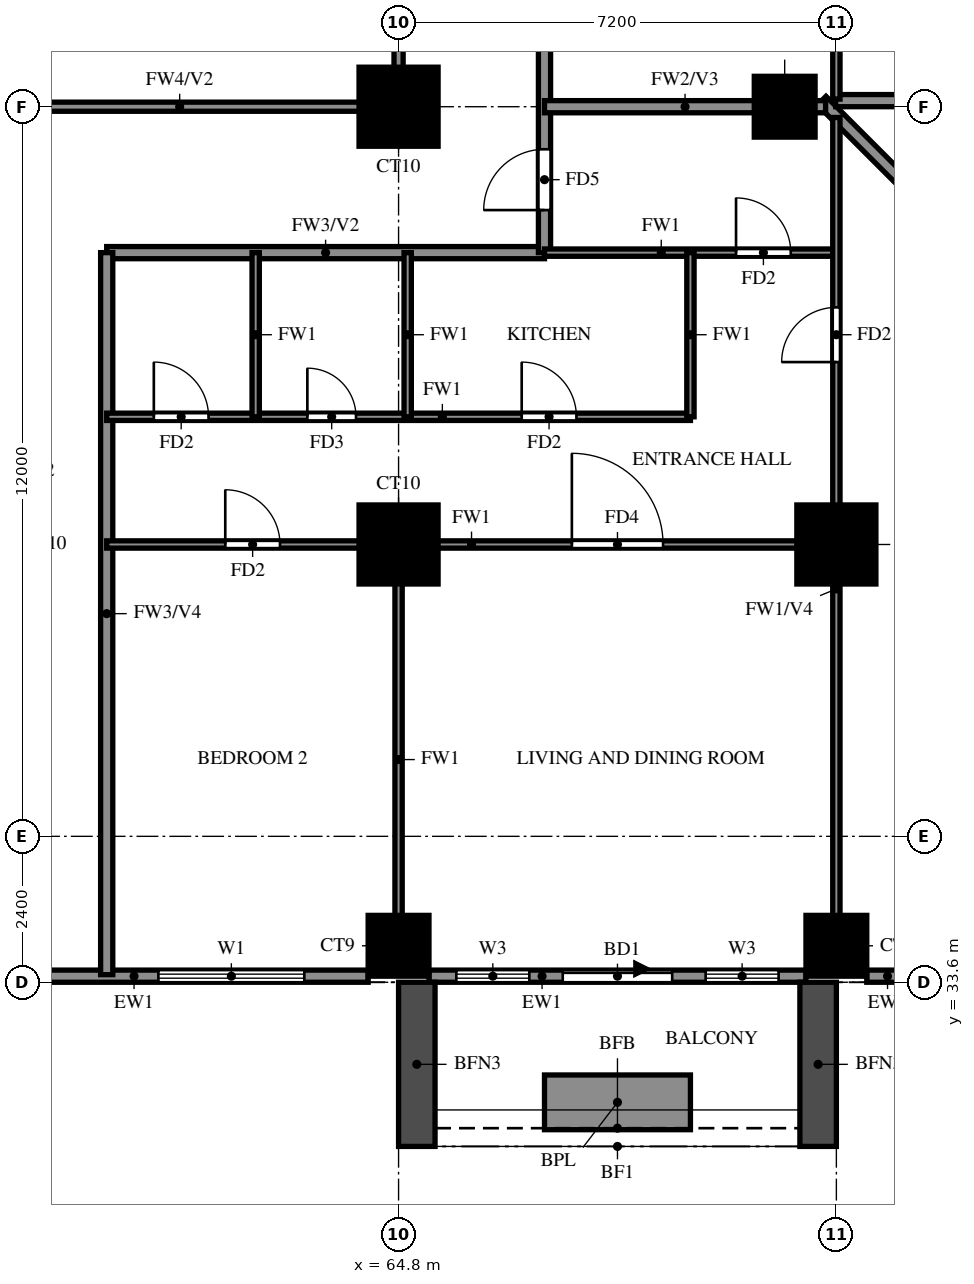
"""IFC4 building model, lengths in metres.
Left out: names, types, materials, properties, quantities, classifications, styles, units other than length and angle.
Written with IfcOpenShell. Run it as: python <this file> out.ifc"""

import sys

from ifc_helpers import new_model, si_unit, direction, frame, frame_2d, origin, origin_2d, place, context, subcontext, project, spatial, rectangle, extrude, source, transform, mapped, element, fill, save


model = new_model("IFC4")
c1 = context("Model", 3, precision=1e-05, world=origin(), true_north=direction((0.0, 1.0)))
c2 = subcontext(c1, "Body", "Model", "MODEL_VIEW")
j1 = project(units=[si_unit("LENGTHUNIT", "METRE"), si_unit("PLANEANGLEUNIT", "RADIAN")], contexts=[c1])
p1 = place(None, origin())
s1 = spatial("IfcSite", under=j1, at=p1, CompositionType="ELEMENT")
p2 = place(p1, origin())
s2 = spatial("IfcBuilding", under=s1, at=p2, CompositionType="ELEMENT")
p3 = place(p2, frame((0.0, 0.0, 65.5)))
s3 = spatial("IfcBuildingStorey", under=s2, at=p3, CompositionType="ELEMENT", Elevation=65.5)
m1 = source(origin(), c2, "Body", "SweptSolid", [
    extrude(rectangle(XDim=1.0, YDim=1.0, at=origin_2d()), origin(), (0.0, 0.0, 1.0), 3.18),
])
for number, where, z_axis, x_axis in (
    (1, (64.8, 34.2, 0.0), (0.0, 0.0, 1.0), (1.0, 0.0, 0.0)),
    (2, (72.0, 34.2, 0.0), (0.0, 0.0, 1.0), (1.0, 0.0, 0.0)),
):
    element("IfcColumn", number, at=place(p3, frame(where, z_axis=z_axis, x_axis=x_axis)), inside=s3, PredefinedType="COLUMN", context=c2, shape_type="MappedRepresentation", body=[
        mapped(m1, transform((0.0, 0.0, 0.0))),
    ])
m2 = source(origin(), c2, "Body", "SweptSolid", [
    extrude(rectangle(XDim=1.3, YDim=1.3, at=origin_2d()), origin(), (0.0, 0.0, 1.0), 3.18),
])
for number, where, z_axis, x_axis in (
    (3, (64.8, 40.8, 0.0), (0.0, 0.0, 1.0), (1.0, 0.0, 0.0)),
    (4, (72.0, 40.8, 0.0), (0.0, 0.0, 1.0), (1.0, 0.0, 0.0)),
    (5, (64.8, 48.0, 0.0), (0.0, 0.0, 1.0), (1.0, 0.0, 0.0)),
):
    element("IfcColumn", number, at=place(p3, frame(where, z_axis=z_axis, x_axis=x_axis)), inside=s3, PredefinedType="COLUMN", context=c2, shape_type="MappedRepresentation", body=[
        mapped(m2, transform((0.0, 0.0, 0.0))),
    ])
p4 = place(p3, frame((71.15, 48.0, 0.0), z_axis=(0.0, 0.0, 1.0), x_axis=(1.0, 0.0, 0.0)))
e6 = element("IfcColumn", 6, at=p4, inside=s3, PredefinedType="COLUMN", context=c2, shape_type="MappedRepresentation", body=[
    mapped(m1, transform((0.0, 0.0, 0.0))),
])
p5 = place(p3, frame((85.996, 33.863, 0.0), z_axis=(0.0, 0.0, 1.0), x_axis=(-0.707100718496, 0.707112843825, 0.0)))
e7 = element("IfcWall", 7, at=p5, inside=s3, PredefinedType="SOLIDWALL", context=c2, shape_type="SweptSolid", body=[
    extrude(rectangle(XDim=20.135, YDim=0.2, at=frame_2d((10.067, 0.0))), origin(), (0.0, 0.0, 1.0), 3.18),
])
p6 = place(p3, frame((71.989, 48.1, 0.0), z_axis=(0.0, 0.0, 1.0), x_axis=(1.0, 0.0, 0.0)))
e8 = element("IfcWall", 8, at=p6, inside=s3, PredefinedType="SOLIDWALL", context=c2, shape_type="SweptSolid", body=[
    extrude(rectangle(XDim=6.562, YDim=0.2, at=frame_2d((3.281, 0.0))), origin(), (0.0, 0.0, 1.0), 3.18),
])
p7 = place(p3, frame((58.8, 33.7, 0.0), z_axis=(0.0, 0.0, 1.0), x_axis=(1.0, 0.0, 0.0)))
e9 = element("IfcWall", 9, at=p7, inside=s3, PredefinedType="SOLIDWALL", context=c2, shape_type="SweptSolid", body=[
    extrude(rectangle(XDim=5.5, YDim=0.2, at=frame_2d((2.75, 0.0))), origin(), (0.0, 0.0, 1.0), 3.18),
])
p8 = place(p7, frame((2.05, 0.0, 0.6)))
e10 = element("IfcOpeningElement", 10, at=p8, cuts=e9, PredefinedType="OPENING", context=c2, shape_type="SweptSolid", body=[
    extrude(rectangle(XDim=2.4, YDim=2.4, at=frame_2d((1.2, 1.2))), frame((0.0, 0.11, 0.0), z_axis=(0.0, -1.0, 0.0), x_axis=(1.0, 0.0, 0.0)), (0.0, 0.0, 1.0), 0.22),
])
p9 = place(p3, frame((65.3, 33.7, 0.0), z_axis=(0.0, 0.0, 1.0), x_axis=(1.0, 0.0, 0.0)))
e11 = element("IfcWall", 11, at=p9, inside=s3, PredefinedType="SOLIDWALL", context=c2, shape_type="SweptSolid", body=[
    extrude(rectangle(XDim=6.2, YDim=0.2, at=frame_2d((3.1, 0.0))), origin(), (0.0, 0.0, 1.0), 3.18),
])
p10 = place(p9, frame((2.2, 0.0, 0.0)))
e12 = element("IfcOpeningElement", 12, at=p10, cuts=e11, PredefinedType="OPENING", context=c2, shape_type="SweptSolid", body=[
    extrude(rectangle(XDim=1.8, YDim=2.4, at=frame_2d((0.9, 1.2))), frame((0.0, 0.11, 0.0), z_axis=(0.0, -1.0, 0.0), x_axis=(1.0, 0.0, 0.0)), (0.0, 0.0, 1.0), 0.22),
])
p11 = place(p9, frame((0.45, 0.0, 0.6)))
e13 = element("IfcOpeningElement", 13, at=p11, cuts=e11, PredefinedType="OPENING", context=c2, shape_type="SweptSolid", body=[
    extrude(rectangle(XDim=1.2, YDim=2.4, at=frame_2d((0.6, 1.2))), frame((0.0, 0.11, 0.0), z_axis=(0.0, -1.0, 0.0), x_axis=(1.0, 0.0, 0.0)), (0.0, 0.0, 1.0), 0.22),
])
p12 = place(p9, frame((4.55, 0.0, 0.6)))
e14 = element("IfcOpeningElement", 14, at=p12, cuts=e11, PredefinedType="OPENING", context=c2, shape_type="SweptSolid", body=[
    extrude(rectangle(XDim=1.2, YDim=2.4, at=frame_2d((0.6, 1.2))), frame((0.0, 0.11, 0.0), z_axis=(0.0, -1.0, 0.0), x_axis=(1.0, 0.0, 0.0)), (0.0, 0.0, 1.0), 0.22),
])
p13 = place(p3, frame((72.5, 33.7, 0.0), z_axis=(0.0, 0.0, 1.0), x_axis=(1.0, 0.0, 0.0)))
e15 = element("IfcWall", 15, at=p13, inside=s3, PredefinedType="SOLIDWALL", context=c2, shape_type="SweptSolid", body=[
    extrude(rectangle(XDim=13.659, YDim=0.2, at=frame_2d((6.829, 0.0))), origin(), (0.0, 0.0, 1.0), 3.18),
])
p14 = place(p13, frame((0.8, 0.0, 0.6)))
e16 = element("IfcOpeningElement", 16, at=p14, cuts=e15, PredefinedType="OPENING", context=c2, shape_type="SweptSolid", body=[
    extrude(rectangle(XDim=2.4, YDim=2.4, at=frame_2d((1.2, 1.2))), frame((0.0, 0.11, 0.0), z_axis=(0.0, -1.0, 0.0), x_axis=(1.0, 0.0, 0.0)), (0.0, 0.0, 1.0), 0.22),
])
p15 = place(p13, frame((3.7, 0.0, 0.6)))
e17 = element("IfcOpeningElement", 17, at=p15, cuts=e15, PredefinedType="OPENING", context=c2, shape_type="SweptSolid", body=[
    extrude(rectangle(XDim=2.4, YDim=2.4, at=frame_2d((1.2, 1.2))), frame((0.0, 0.11, 0.0), z_axis=(0.0, -1.0, 0.0), x_axis=(1.0, 0.0, 0.0)), (0.0, 0.0, 1.0), 0.22),
])
p16 = place(p13, frame((7.386, 0.0, 0.6)))
e18 = element("IfcOpeningElement", 18, at=p16, cuts=e15, PredefinedType="OPENING", context=c2, shape_type="SweptSolid", body=[
    extrude(rectangle(XDim=2.4, YDim=2.4, at=frame_2d((1.2, 1.2))), frame((0.0, 0.11, 0.0), z_axis=(0.0, -1.0, 0.0), x_axis=(1.0, 0.0, 0.0)), (0.0, 0.0, 1.0), 0.22),
])
p17 = place(p13, frame((10.372, 0.0, 0.6)))
e19 = element("IfcOpeningElement", 19, at=p17, cuts=e15, PredefinedType="OPENING", context=c2, shape_type="SweptSolid", body=[
    extrude(rectangle(XDim=2.4, YDim=2.4, at=frame_2d((1.2, 1.2))), frame((0.0, 0.11, 0.0), z_axis=(0.0, -1.0, 0.0), x_axis=(1.0, 0.0, 0.0)), (0.0, 0.0, 1.0), 0.22),
])
for number, where, z_axis, x_axis in (
    (20, (65.1, 33.6, 0.0), (0.0, 0.0, 1.0), (0.0, -1.0, 0.0)),
    (21, (71.7, 33.6, 0.0), (0.0, 0.0, 1.0), (0.0, -1.0, 0.0)),
):
    element("IfcWall", number, at=place(p3, frame(where, z_axis=z_axis, x_axis=x_axis)), inside=s3, PredefinedType="SOLIDWALL", context=c2, shape_type="SweptSolid", body=[
        extrude(rectangle(XDim=2.7, YDim=0.6, at=frame_2d((1.35, 0.0))), origin(), (0.0, 0.0, 1.0), 2.85),
    ])
p18 = place(p3, frame((67.2, 31.625, 0.0), z_axis=(0.0, 0.0, 1.0), x_axis=(1.0, 0.0, 0.0)))
e22 = element("IfcWall", 22, at=p18, inside=s3, PredefinedType="SOLIDWALL", context=c2, shape_type="SweptSolid", body=[
    extrude(rectangle(XDim=2.4, YDim=0.9, at=frame_2d((1.2, 0.0))), origin(), (0.0, 0.0, 1.0), 0.9),
])
p19 = place(p3, frame((60.0, 45.6, 0.0), z_axis=(0.0, 0.0, 1.0), x_axis=(1.0, 0.0, 0.0)))
e23 = element("IfcWall", 23, at=p19, inside=s3, PredefinedType="SOLIDWALL", context=c2, shape_type="SweptSolid", body=[
    extrude(rectangle(XDim=7.2, YDim=0.2, at=frame_2d((3.6, 0.0))), origin(), (0.0, 0.0, 1.0), 3.18),
])
p20 = place(p3, frame((60.0, 33.725, 0.0), z_axis=(0.0, 0.0, 1.0), x_axis=(0.0, 1.0, 0.0)))
e24 = element("IfcWall", 24, at=p20, inside=s3, PredefinedType="SOLIDWALL", context=c2, shape_type="SweptSolid", body=[
    extrude(rectangle(XDim=11.875, YDim=0.2, at=frame_2d((5.938, 0.0))), origin(), (0.0, 0.0, 1.0), 2.28),
])
p21 = place(p3, frame((67.2, 45.6, 0.0), z_axis=(0.0, 0.0, 1.0), x_axis=(0.0, 1.0, 0.0)))
e25 = element("IfcWall", 25, at=p21, inside=s3, PredefinedType="SOLIDWALL", context=c2, shape_type="SweptSolid", body=[
    extrude(rectangle(XDim=12.0, YDim=0.2, at=frame_2d((6.0, 0.0))), origin(), (0.0, 0.0, 1.0), 3.18),
])
p22 = place(p21, frame((10.3, 0.0, 0.0)))
e26 = element("IfcOpeningElement", 26, at=p22, cuts=e25, PredefinedType="OPENING", context=c2, shape_type="SweptSolid", body=[
    extrude(rectangle(XDim=1.0, YDim=2.1, at=frame_2d((0.5, 1.05))), frame((0.0, 0.11, 0.0), z_axis=(0.0, -1.0, 0.0), x_axis=(1.0, 0.0, 0.0)), (0.0, 0.0, 1.0), 0.22),
])
p23 = place(p21, frame((0.7, 0.0, 0.0)))
e27 = element("IfcOpeningElement", 27, at=p23, cuts=e25, PredefinedType="OPENING", context=c2, shape_type="SweptSolid", body=[
    extrude(rectangle(XDim=1.0, YDim=2.1, at=frame_2d((0.5, 1.05))), frame((0.0, 0.11, 0.0), z_axis=(0.0, -1.0, 0.0), x_axis=(1.0, 0.0, 0.0)), (0.0, 0.0, 1.0), 0.22),
])
p24 = place(p3, frame((67.2, 48.0, 0.0), z_axis=(0.0, 0.0, 1.0), x_axis=(1.0, 0.0, 0.0)))
e28 = element("IfcWall", 28, at=p24, inside=s3, PredefinedType="SOLIDWALL", context=c2, shape_type="SweptSolid", body=[
    extrude(rectangle(XDim=4.623, YDim=0.2, at=frame_2d((2.312, 0.0))), origin(), (0.0, 0.0, 1.0), 3.18),
])
p25 = place(p3, frame((60.0, 40.8, 0.0), z_axis=(0.0, 0.0, 1.0), x_axis=(1.0, 0.0, 0.0)))
e29 = element("IfcWall", 29, at=p25, inside=s3, PredefinedType="PARTITIONING", context=c2, shape_type="SweptSolid", body=[
    extrude(rectangle(XDim=12.0, YDim=0.12, at=frame_2d((6.0, 0.0))), origin(), (0.0, 0.0, 1.0), 3.18),
])
p26 = place(p25, frame((7.65, 0.0, 0.0)))
e30 = element("IfcOpeningElement", 30, at=p26, cuts=e29, PredefinedType="OPENING", context=c2, shape_type="SweptSolid", body=[
    extrude(rectangle(XDim=1.5, YDim=2.1, at=frame_2d((0.75, 1.05))), frame((0.0, 0.07, 0.0), z_axis=(0.0, -1.0, 0.0), x_axis=(1.0, 0.0, 0.0)), (0.0, 0.0, 1.0), 0.14),
])
p27 = place(p25, frame((1.95, 0.0, 0.0)))
e31 = element("IfcOpeningElement", 31, at=p27, cuts=e29, PredefinedType="OPENING", context=c2, shape_type="SweptSolid", body=[
    extrude(rectangle(XDim=0.9, YDim=2.1, at=frame_2d((0.45, 1.05))), frame((0.0, 0.07, 0.0), z_axis=(0.0, -1.0, 0.0), x_axis=(1.0, 0.0, 0.0)), (0.0, 0.0, 1.0), 0.14),
])
p28 = place(p3, frame((60.0, 42.9, 0.0), z_axis=(0.0, 0.0, 1.0), x_axis=(1.0, 0.0, 0.0)))
e32 = element("IfcWall", 32, at=p28, inside=s3, PredefinedType="PARTITIONING", context=c2, shape_type="SweptSolid", body=[
    extrude(rectangle(XDim=9.6, YDim=0.12, at=frame_2d((4.8, 0.0))), origin(), (0.0, 0.0, 1.0), 3.18),
])
p29 = place(p28, frame((6.825, 0.0, 0.0)))
e33 = element("IfcOpeningElement", 33, at=p29, cuts=e32, PredefinedType="OPENING", context=c2, shape_type="SweptSolid", body=[
    extrude(rectangle(XDim=0.9, YDim=2.1, at=frame_2d((0.45, 1.05))), frame((0.0, 0.07, 0.0), z_axis=(0.0, -1.0, 0.0), x_axis=(1.0, 0.0, 0.0)), (0.0, 0.0, 1.0), 0.14),
])
p30 = place(p28, frame((3.3, 0.0, 0.0)))
e34 = element("IfcOpeningElement", 34, at=p30, cuts=e32, PredefinedType="OPENING", context=c2, shape_type="SweptSolid", body=[
    extrude(rectangle(XDim=0.8, YDim=2.1, at=frame_2d((0.4, 1.05))), frame((0.0, 0.07, 0.0), z_axis=(0.0, -1.0, 0.0), x_axis=(1.0, 0.0, 0.0)), (0.0, 0.0, 1.0), 0.14),
])
p31 = place(p28, frame((0.775, 0.0, 0.0)))
e35 = element("IfcOpeningElement", 35, at=p31, cuts=e32, PredefinedType="OPENING", context=c2, shape_type="SweptSolid", body=[
    extrude(rectangle(XDim=0.9, YDim=2.1, at=frame_2d((0.45, 1.05))), frame((0.0, 0.07, 0.0), z_axis=(0.0, -1.0, 0.0), x_axis=(1.0, 0.0, 0.0)), (0.0, 0.0, 1.0), 0.14),
])
p32 = place(p3, frame((67.2, 45.6, 0.0), z_axis=(0.0, 0.0, 1.0), x_axis=(1.0, 0.0, 0.0)))
e36 = element("IfcWall", 36, at=p32, inside=s3, PredefinedType="PARTITIONING", context=c2, shape_type="SweptSolid", body=[
    extrude(rectangle(XDim=4.8, YDim=0.12, at=frame_2d((2.4, 0.0))), origin(), (0.0, 0.0, 1.0), 3.18),
])
p33 = place(p32, frame((3.15, 0.0, 0.0)))
e37 = element("IfcOpeningElement", 37, at=p33, cuts=e36, PredefinedType="OPENING", context=c2, shape_type="SweptSolid", body=[
    extrude(rectangle(XDim=0.9, YDim=2.1, at=frame_2d((0.45, 1.05))), frame((0.0, 0.07, 0.0), z_axis=(0.0, -1.0, 0.0), x_axis=(1.0, 0.0, 0.0)), (0.0, 0.0, 1.0), 0.14),
])
p34 = place(p3, frame((62.45, 42.9, 0.0), z_axis=(0.0, 0.0, 1.0), x_axis=(0.0, 1.0, 0.0)))
e38 = element("IfcWall", 38, at=p34, inside=s3, PredefinedType="PARTITIONING", context=c2, shape_type="SweptSolid", body=[
    extrude(rectangle(XDim=2.7, YDim=0.12, at=frame_2d((1.35, 0.0))), origin(), (0.0, 0.0, 1.0), 3.18),
])
p35 = place(p3, frame((64.8, 33.725, 0.0), z_axis=(0.0, 0.0, 1.0), x_axis=(0.0, 1.0, 0.0)))
e39 = element("IfcWall", 39, at=p35, inside=s3, PredefinedType="PARTITIONING", context=c2, shape_type="SweptSolid", body=[
    extrude(rectangle(XDim=7.075, YDim=0.12, at=frame_2d((3.538, 0.0))), origin(), (0.0, 0.0, 1.0), 3.18),
])
for number, where, z_axis, x_axis in (
    (40, (64.95, 42.9, 0.0), (0.0, 0.0, 1.0), (0.0, 1.0, 0.0)),
    (41, (69.6, 42.9, 0.0), (0.0, 0.0, 1.0), (0.0, 1.0, 0.0)),
):
    element("IfcWall", number, at=place(p3, frame(where, z_axis=z_axis, x_axis=x_axis)), inside=s3, PredefinedType="PARTITIONING", context=c2, shape_type="SweptSolid", body=[
        extrude(rectangle(XDim=2.7, YDim=0.12, at=frame_2d((1.35, 0.0))), origin(), (0.0, 0.0, 1.0), 3.18),
    ])
p36 = place(p3, frame((72.0, 33.725, 0.0), z_axis=(0.0, 0.0, 1.0), x_axis=(0.0, 1.0, 0.0)))
e42 = element("IfcWall", 42, at=p36, inside=s3, PredefinedType="PARTITIONING", context=c2, shape_type="SweptSolid", body=[
    extrude(rectangle(XDim=14.098, YDim=0.12, at=frame_2d((7.049, 0.0))), origin(), (0.0, 0.0, 1.0), 2.28),
])
p37 = place(p36, frame((10.075, 0.0, 0.0)))
e43 = element("IfcOpeningElement", 43, at=p37, cuts=e42, PredefinedType="OPENING", context=c2, shape_type="SweptSolid", body=[
    extrude(rectangle(XDim=0.9, YDim=2.1, at=frame_2d((0.45, 1.05))), frame((0.0, 0.07, 0.0), z_axis=(0.0, -1.0, 0.0), x_axis=(1.0, 0.0, 0.0)), (0.0, 0.0, 1.0), 0.14),
])
p38 = place(p3, frame((72.0, 48.125, 0.0), z_axis=(0.0, 0.0, 1.0), x_axis=(0.0, 1.0, 0.0)))
e44 = element("IfcWall", 44, at=p38, inside=s3, PredefinedType="PARTITIONING", context=c2, shape_type="SweptSolid", body=[
    extrude(rectangle(XDim=7.075, YDim=0.12, at=frame_2d((3.538, 0.0))), origin(), (0.0, 0.0, 1.0), 3.18),
])
p39 = place(p3, frame((57.6, 48.0, 0.0), z_axis=(0.0, 0.0, 1.0), x_axis=(1.0, 0.0, 0.0)))
e45 = element("IfcWall", 45, at=p39, inside=s3, PredefinedType="SOLIDWALL", context=c2, shape_type="SweptSolid", body=[
    extrude(rectangle(XDim=7.2, YDim=0.15, at=frame_2d((3.6, 0.0))), origin(), (0.0, 0.0, 1.0), 2.28),
])
p40 = place(p3, frame((64.8, 48.0, 0.0), z_axis=(0.0, 0.0, 1.0), x_axis=(0.0, 1.0, 0.0)))
e46 = element("IfcWall", 46, at=p40, inside=s3, PredefinedType="SOLIDWALL", context=c2, shape_type="SweptSolid", body=[
    extrude(rectangle(XDim=14.4, YDim=0.15, at=frame_2d((7.2, 0.0))), origin(), (0.0, 0.0, 1.0), 2.28),
])
p41 = place(p8, origin())
e47 = element("IfcWindow", 47, at=p41, inside=s3, PartitioningType="DOUBLE_PANEL_VERTICAL", PredefinedType="WINDOW", context=c2, shape_type="SweptSolid", body=[
    extrude(rectangle(XDim=2.4, YDim=2.4, at=frame_2d((1.2, 1.2))), frame((0.0, 0.03, 0.0), z_axis=(0.0, -1.0, 0.0), x_axis=(1.0, 0.0, 0.0)), (0.0, 0.0, 1.0), 0.06),
])
fill(e10, e47)
p42 = place(p10, origin())
e48 = element("IfcDoor", 48, at=p42, inside=s3, OperationType="DOUBLE_DOOR_SLIDING", PredefinedType="DOOR", context=c2, shape_type="SweptSolid", body=[
    extrude(rectangle(XDim=1.8, YDim=2.4, at=frame_2d((0.9, 1.2))), frame((0.0, 0.025, 0.0), z_axis=(0.0, -1.0, 0.0), x_axis=(1.0, 0.0, 0.0)), (0.0, 0.0, 1.0), 0.05),
])
fill(e12, e48)
p43 = place(p11, origin())
e49 = element("IfcWindow", 49, at=p43, inside=s3, PartitioningType="SINGLE_PANEL", PredefinedType="WINDOW", context=c2, shape_type="SweptSolid", body=[
    extrude(rectangle(XDim=1.2, YDim=2.4, at=frame_2d((0.6, 1.2))), frame((0.0, 0.03, 0.0), z_axis=(0.0, -1.0, 0.0), x_axis=(1.0, 0.0, 0.0)), (0.0, 0.0, 1.0), 0.06),
])
fill(e13, e49)
p44 = place(p12, origin())
e50 = element("IfcWindow", 50, at=p44, inside=s3, PartitioningType="SINGLE_PANEL", PredefinedType="WINDOW", context=c2, shape_type="SweptSolid", body=[
    extrude(rectangle(XDim=1.2, YDim=2.4, at=frame_2d((0.6, 1.2))), frame((0.0, 0.03, 0.0), z_axis=(0.0, -1.0, 0.0), x_axis=(1.0, 0.0, 0.0)), (0.0, 0.0, 1.0), 0.06),
])
fill(e14, e50)
p45 = place(p33, origin())
e51 = element("IfcDoor", 51, at=p45, inside=s3, OperationType="SINGLE_SWING_LEFT", PredefinedType="DOOR", context=c2, shape_type="SweptSolid", body=[
    extrude(rectangle(XDim=0.9, YDim=2.1, at=frame_2d((0.45, 1.05))), frame((0.0, 0.025, 0.0), z_axis=(0.0, -1.0, 0.0), x_axis=(1.0, 0.0, 0.0)), (0.0, 0.0, 1.0), 0.05),
])
fill(e37, e51)
p46 = place(p23, origin())
e52 = element("IfcDoor", 52, at=p46, inside=s3, OperationType="SINGLE_SWING_RIGHT", PredefinedType="DOOR", context=c2, shape_type="SweptSolid", body=[
    extrude(rectangle(XDim=1.0, YDim=2.1, at=frame_2d((0.5, 1.05))), frame((0.0, 0.025, 0.0), z_axis=(0.0, -1.0, 0.0), x_axis=(1.0, 0.0, 0.0)), (0.0, 0.0, 1.0), 0.05),
])
fill(e27, e52)
p47 = place(p26, origin())
e53 = element("IfcDoor", 53, at=p47, inside=s3, OperationType="SINGLE_SWING_LEFT", PredefinedType="DOOR", context=c2, shape_type="SweptSolid", body=[
    extrude(rectangle(XDim=1.5, YDim=2.1, at=frame_2d((0.75, 1.05))), frame((0.0, 0.025, 0.0), z_axis=(0.0, -1.0, 0.0), x_axis=(1.0, 0.0, 0.0)), (0.0, 0.0, 1.0), 0.05),
])
fill(e30, e53)
p48 = place(p27, origin())
e54 = element("IfcDoor", 54, at=p48, inside=s3, OperationType="SINGLE_SWING_LEFT", PredefinedType="DOOR", context=c2, shape_type="SweptSolid", body=[
    extrude(rectangle(XDim=0.9, YDim=2.1, at=frame_2d((0.45, 1.05))), frame((0.0, 0.025, 0.0), z_axis=(0.0, -1.0, 0.0), x_axis=(1.0, 0.0, 0.0)), (0.0, 0.0, 1.0), 0.05),
])
fill(e31, e54)
p49 = place(p29, origin())
e55 = element("IfcDoor", 55, at=p49, inside=s3, OperationType="SINGLE_SWING_RIGHT", PredefinedType="DOOR", context=c2, shape_type="SweptSolid", body=[
    extrude(rectangle(XDim=0.9, YDim=2.1, at=frame_2d((0.45, 1.05))), frame((0.0, 0.025, 0.0), z_axis=(0.0, -1.0, 0.0), x_axis=(1.0, 0.0, 0.0)), (0.0, 0.0, 1.0), 0.05),
])
fill(e33, e55)
p50 = place(p30, origin())
e56 = element("IfcDoor", 56, at=p50, inside=s3, OperationType="SINGLE_SWING_LEFT", PredefinedType="DOOR", context=c2, shape_type="SweptSolid", body=[
    extrude(rectangle(XDim=0.8, YDim=2.1, at=frame_2d((0.4, 1.05))), frame((0.0, 0.025, 0.0), z_axis=(0.0, -1.0, 0.0), x_axis=(1.0, 0.0, 0.0)), (0.0, 0.0, 1.0), 0.05),
])
fill(e34, e56)
p51 = place(p31, origin())
e57 = element("IfcDoor", 57, at=p51, inside=s3, OperationType="SINGLE_SWING_LEFT", PredefinedType="DOOR", context=c2, shape_type="SweptSolid", body=[
    extrude(rectangle(XDim=0.9, YDim=2.1, at=frame_2d((0.45, 1.05))), frame((0.0, 0.025, 0.0), z_axis=(0.0, -1.0, 0.0), x_axis=(1.0, 0.0, 0.0)), (0.0, 0.0, 1.0), 0.05),
])
fill(e35, e57)
p52 = place(p37, origin())
e58 = element("IfcDoor", 58, at=p52, inside=s3, OperationType="SINGLE_SWING_RIGHT", PredefinedType="DOOR", context=c2, shape_type="SweptSolid", body=[
    extrude(rectangle(XDim=0.9, YDim=2.1, at=frame_2d((0.45, 1.05))), frame((0.0, 0.025, 0.0), z_axis=(0.0, -1.0, 0.0), x_axis=(1.0, 0.0, 0.0)), (0.0, 0.0, 1.0), 0.05),
])
fill(e43, e58)
save(model, sys.argv[1])
